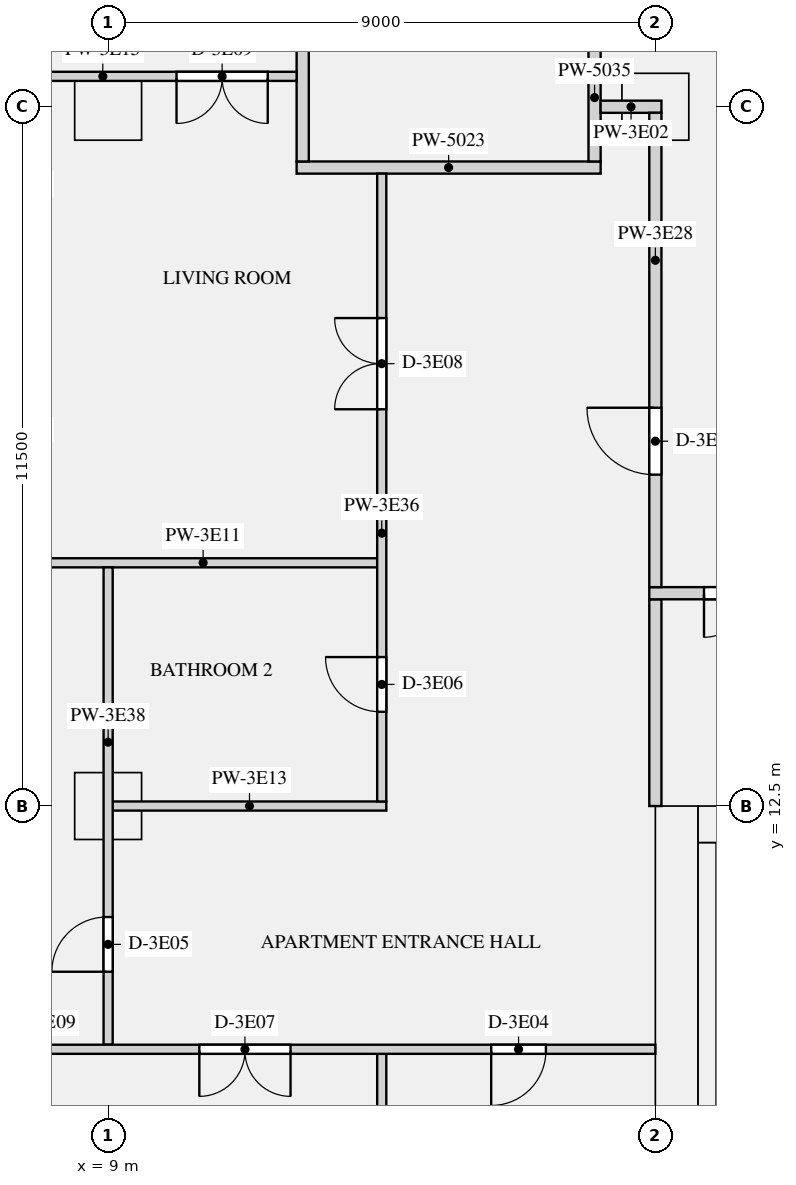
"""IFC4 building model, lengths in metres.
Left out: names, types, materials, properties, quantities, classifications, styles, units other than length and angle.
Written with IfcOpenShell. Run it as: python <this file> out.ifc"""

import sys

from ifc_helpers import new_model, si_unit, direction, frame, frame_2d, origin, origin_2d, place, context, subcontext, project, spatial, rectangle, extrude, element, fill, save


model = new_model("IFC4")
c1 = context("Model", 3, precision=1e-05, world=origin(), true_north=direction((0.0, 1.0)))
c2 = subcontext(c1, "Body", "Model", "MODEL_VIEW")
j1 = project(units=[si_unit("LENGTHUNIT", "METRE"), si_unit("PLANEANGLEUNIT", "RADIAN")], contexts=[c1])
p1 = place(None, origin())
s1 = spatial("IfcSite", under=j1, at=p1, CompositionType="ELEMENT")
p2 = place(p1, origin())
s2 = spatial("IfcBuilding", under=s1, at=p2, CompositionType="ELEMENT")
p3 = place(p2, frame((0.0, 0.0, 172.8)))
s3 = spatial("IfcBuildingStorey", under=s2, at=p3, CompositionType="ELEMENT", Elevation=172.8)
for number, where, z_axis, x_axis in (
    (1, (9.0, 24.0, 0.0), (0.0, 0.0, 1.0), (1.0, 0.0, 0.0)),
    (2, (18.0, 24.0, 0.0), (0.0, 0.0, 1.0), (1.0, 0.0, 0.0)),
    (3, (9.0, 12.5, 0.0), (0.0, 0.0, 1.0), (1.0, 0.0, 0.0)),
):
    element("IfcColumn", number, at=place(p3, frame(where, z_axis=z_axis, x_axis=x_axis)), inside=s3, PredefinedType="COLUMN", context=c2, shape_type="SweptSolid", body=[
        extrude(rectangle(XDim=1.1, YDim=1.1, at=origin_2d()), origin(), (0.0, 0.0, 1.0), 3.15),
    ])
p4 = place(p3, frame((18.35, 0.0, 0.0), z_axis=(0.0, 0.0, 1.0), x_axis=(0.0, 1.0, 0.0)))
e4 = element("IfcWall", 4, at=p4, inside=s3, PredefinedType="SHEAR", context=c2, shape_type="SweptSolid", body=[
    extrude(rectangle(XDim=12.5, YDim=0.7, at=frame_2d((6.25, 0.0))), origin(), (0.0, 0.0, 1.0), 3.15),
])
p5 = place(p3, frame((18.7, 12.2, 0.0), z_axis=(0.0, 0.0, 1.0), x_axis=(1.0, 0.0, 0.0)))
e5 = element("IfcWall", 5, at=p5, inside=s3, PredefinedType="SHEAR", context=c2, shape_type="SweptSolid", body=[
    extrude(rectangle(XDim=34.6, YDim=0.6, at=frame_2d((17.3, 0.0))), origin(), (0.0, 0.0, 1.0), 3.15),
])
p6 = place(p5, frame((24.475, 0.0, 0.0)))
e6 = element("IfcOpeningElement", 6, at=p6, cuts=e5, PredefinedType="OPENING", context=c2, shape_type="SweptSolid", body=[
    extrude(rectangle(XDim=1.1, YDim=2.1, at=frame_2d((0.55, 1.05))), frame((0.0, 0.31, 0.0), z_axis=(0.0, -1.0, 0.0), x_axis=(1.0, 0.0, 0.0)), (0.0, 0.0, 1.0), 0.62),
])
p7 = place(p5, frame((26.725, 0.0, 0.0)))
e7 = element("IfcOpeningElement", 7, at=p7, cuts=e5, PredefinedType="OPENING", context=c2, shape_type="SweptSolid", body=[
    extrude(rectangle(XDim=1.1, YDim=2.1, at=frame_2d((0.55, 1.05))), frame((0.0, 0.31, 0.0), z_axis=(0.0, -1.0, 0.0), x_axis=(1.0, 0.0, 0.0)), (0.0, 0.0, 1.0), 0.62),
])
p8 = place(p5, frame((28.975, 0.0, 0.0)))
e8 = element("IfcOpeningElement", 8, at=p8, cuts=e5, PredefinedType="OPENING", context=c2, shape_type="SweptSolid", body=[
    extrude(rectangle(XDim=1.1, YDim=2.1, at=frame_2d((0.55, 1.05))), frame((0.0, 0.31, 0.0), z_axis=(0.0, -1.0, 0.0), x_axis=(1.0, 0.0, 0.0)), (0.0, 0.0, 1.0), 0.62),
])
p9 = place(p5, frame((11.85, 0.0, 0.0)))
e9 = element("IfcOpeningElement", 9, at=p9, cuts=e5, PredefinedType="OPENING", context=c2, shape_type="SweptSolid", body=[
    extrude(rectangle(XDim=0.9, YDim=2.1, at=frame_2d((0.45, 1.05))), frame((0.0, 0.31, 0.0), z_axis=(0.0, -1.0, 0.0), x_axis=(1.0, 0.0, 0.0)), (0.0, 0.0, 1.0), 0.62),
])
p10 = place(p5, frame((18.35, 0.0, 0.0)))
e10 = element("IfcOpeningElement", 10, at=p10, cuts=e5, PredefinedType="OPENING", context=c2, shape_type="SweptSolid", body=[
    extrude(rectangle(XDim=0.9, YDim=2.1, at=frame_2d((0.45, 1.05))), frame((0.0, 0.31, 0.0), z_axis=(0.0, -1.0, 0.0), x_axis=(1.0, 0.0, 0.0)), (0.0, 0.0, 1.0), 0.62),
])
p11 = place(p5, frame((1.45, 0.0, 0.0)))
e11 = element("IfcOpeningElement", 11, at=p11, cuts=e5, PredefinedType="OPENING", context=c2, shape_type="SweptSolid", body=[
    extrude(rectangle(XDim=1.2, YDim=2.1, at=frame_2d((0.6, 1.05))), frame((0.0, 0.31, 0.0), z_axis=(0.0, -1.0, 0.0), x_axis=(1.0, 0.0, 0.0)), (0.0, 0.0, 1.0), 0.62),
])
p12 = place(p5, frame((31.95, 0.0, 0.0)))
e12 = element("IfcOpeningElement", 12, at=p12, cuts=e5, PredefinedType="OPENING", context=c2, shape_type="SweptSolid", body=[
    extrude(rectangle(XDim=1.2, YDim=2.1, at=frame_2d((0.6, 1.05))), frame((0.0, 0.31, 0.0), z_axis=(0.0, -1.0, 0.0), x_axis=(1.0, 0.0, 0.0)), (0.0, 0.0, 1.0), 0.62),
])
p13 = place(p3, frame((18.85, 1.0, 0.0), z_axis=(0.0, 0.0, 1.0), x_axis=(0.0, 1.0, 0.0)))
e13 = element("IfcWall", 13, at=p13, inside=s3, PredefinedType="SHEAR", context=c2, shape_type="SweptSolid", body=[
    extrude(rectangle(XDim=10.9, YDim=0.3, at=frame_2d((5.45, 0.0))), origin(), (0.0, 0.0, 1.0), 3.15),
])
p14 = place(p3, frame((12.1, 23.0, 0.0), z_axis=(0.0, 0.0, 1.0), x_axis=(1.0, 0.0, 0.0)))
e14 = element("IfcWall", 14, at=p14, inside=s3, PredefinedType="PARTITIONING", context=c2, shape_type="SweptSolid", body=[
    extrude(rectangle(XDim=5.0, YDim=0.2, at=frame_2d((2.5, 0.0))), origin(), (0.0, 0.0, 1.0), 2.83),
])
p15 = place(p3, frame((18.0, 12.5, 0.0), z_axis=(0.0, 0.0, 1.0), x_axis=(0.0, 1.0, 0.0)))
e15 = element("IfcWall", 15, at=p15, inside=s3, PredefinedType="PARTITIONING", context=c2, shape_type="SweptSolid", body=[
    extrude(rectangle(XDim=3.4, YDim=0.2, at=frame_2d((1.7, 0.0))), origin(), (0.0, 0.0, 1.0), 2.83),
])
p16 = place(p3, frame((12.2, 23.1, 0.0), z_axis=(0.0, 0.0, 1.0), x_axis=(0.0, 1.0, 0.0)))
e16 = element("IfcWall", 16, at=p16, inside=s3, PredefinedType="PARTITIONING", context=c2, shape_type="SweptSolid", body=[
    extrude(rectangle(XDim=3.9, YDim=0.2, at=frame_2d((1.95, 0.0))), origin(), (0.0, 0.0, 1.0), 2.83),
])
p17 = place(p3, frame((17.0, 23.1, 0.0), z_axis=(0.0, 0.0, 1.0), x_axis=(0.0, 1.0, 0.0)))
e17 = element("IfcWall", 17, at=p17, inside=s3, PredefinedType="PARTITIONING", context=c2, shape_type="SweptSolid", body=[
    extrude(rectangle(XDim=3.8, YDim=0.2, at=frame_2d((1.9, 0.0))), origin(), (0.0, 0.0, 1.0), 2.83),
])
p18 = place(p17, frame((2.1, 0.0, 0.0)))
e18 = element("IfcOpeningElement", 18, at=p18, cuts=e17, PredefinedType="OPENING", context=c2, shape_type="SweptSolid", body=[
    extrude(rectangle(XDim=1.2, YDim=2.1, at=frame_2d((0.6, 1.05))), frame((0.0, 0.11, 0.0), z_axis=(0.0, -1.0, 0.0), x_axis=(1.0, 0.0, 0.0)), (0.0, 0.0, 1.0), 0.22),
])
p19 = place(p3, frame((17.1, 24.0, 0.0), z_axis=(0.0, 0.0, 1.0), x_axis=(1.0, 0.0, 0.0)))
e19 = element("IfcWall", 19, at=p19, inside=s3, PredefinedType="PARTITIONING", context=c2, shape_type="SweptSolid", body=[
    extrude(rectangle(XDim=1.0, YDim=0.2, at=frame_2d((0.5, 0.0))), origin(), (0.0, 0.0, 1.0), 2.83),
])
p20 = place(p3, frame((5.2, 8.5, 0.0), z_axis=(0.0, 0.0, 1.0), x_axis=(1.0, 0.0, 0.0)))
e20 = element("IfcWall", 20, at=p20, inside=s3, PredefinedType="PARTITIONING", context=c2, shape_type="SweptSolid", body=[
    extrude(rectangle(XDim=12.8, YDim=0.15, at=frame_2d((6.4, 0.0))), origin(), (0.0, 0.0, 1.0), 2.83),
])
p21 = place(p20, frame((10.1, 0.0, 0.0)))
e21 = element("IfcOpeningElement", 21, at=p21, cuts=e20, PredefinedType="OPENING", context=c2, shape_type="SweptSolid", body=[
    extrude(rectangle(XDim=0.9, YDim=2.1, at=frame_2d((0.45, 1.05))), frame((0.0, 0.085, 0.0), z_axis=(0.0, -1.0, 0.0), x_axis=(1.0, 0.0, 0.0)), (0.0, 0.0, 1.0), 0.17),
])
p22 = place(p20, frame((5.3, 0.0, 0.0)))
e22 = element("IfcOpeningElement", 22, at=p22, cuts=e20, PredefinedType="OPENING", context=c2, shape_type="SweptSolid", body=[
    extrude(rectangle(XDim=1.5, YDim=2.1, at=frame_2d((0.75, 1.05))), frame((0.0, 0.085, 0.0), z_axis=(0.0, -1.0, 0.0), x_axis=(1.0, 0.0, 0.0)), (0.0, 0.0, 1.0), 0.17),
])
p23 = place(p3, frame((7.7, 16.5, 0.0), z_axis=(0.0, 0.0, 1.0), x_axis=(1.0, 0.0, 0.0)))
e23 = element("IfcWall", 23, at=p23, inside=s3, PredefinedType="PARTITIONING", context=c2, shape_type="SweptSolid", body=[
    extrude(rectangle(XDim=5.725, YDim=0.15, at=frame_2d((2.863, 0.0))), origin(), (0.0, 0.0, 1.0), 2.83),
])
p24 = place(p3, frame((9.075, 12.5, 0.0), z_axis=(0.0, 0.0, 1.0), x_axis=(1.0, 0.0, 0.0)))
e24 = element("IfcWall", 24, at=p24, inside=s3, PredefinedType="PARTITIONING", context=c2, shape_type="SweptSolid", body=[
    extrude(rectangle(XDim=4.5, YDim=0.15, at=frame_2d((2.25, 0.0))), origin(), (0.0, 0.0, 1.0), 2.83),
])
p25 = place(p3, frame((7.7, 24.5, 0.0), z_axis=(0.0, 0.0, 1.0), x_axis=(1.0, 0.0, 0.0)))
e25 = element("IfcWall", 25, at=p25, inside=s3, PredefinedType="PARTITIONING", context=c2, shape_type="SweptSolid", body=[
    extrude(rectangle(XDim=4.4, YDim=0.15, at=frame_2d((2.2, 0.0))), origin(), (0.0, 0.0, 1.0), 2.83),
])
p26 = place(p25, frame((2.425, 0.0, 0.0)))
e26 = element("IfcOpeningElement", 26, at=p26, cuts=e25, PredefinedType="OPENING", context=c2, shape_type="SweptSolid", body=[
    extrude(rectangle(XDim=1.5, YDim=2.1, at=frame_2d((0.75, 1.05))), frame((0.0, 0.085, 0.0), z_axis=(0.0, -1.0, 0.0), x_axis=(1.0, 0.0, 0.0)), (0.0, 0.0, 1.0), 0.17),
])
p27 = place(p3, frame((17.9, 16.0, 0.0), z_axis=(0.0, 0.0, 1.0), x_axis=(1.0, 0.0, 0.0)))
e27 = element("IfcWall", 27, at=p27, inside=s3, PredefinedType="PARTITIONING", context=c2, shape_type="SweptSolid", body=[
    extrude(rectangle(XDim=36.2, YDim=0.2, at=frame_2d((18.1, 0.0))), origin(), (0.0, 0.0, 1.0), 2.83),
])
p28 = place(p27, frame((0.9, 0.0, 0.0)))
e28 = element("IfcOpeningElement", 28, at=p28, cuts=e27, PredefinedType="OPENING", context=c2, shape_type="SweptSolid", body=[
    extrude(rectangle(XDim=1.4, YDim=2.1, at=frame_2d((0.7, 1.05))), frame((0.0, 0.11, 0.0), z_axis=(0.0, -1.0, 0.0), x_axis=(1.0, 0.0, 0.0)), (0.0, 0.0, 1.0), 0.22),
])
p29 = place(p27, frame((33.9, 0.0, 0.0)))
e29 = element("IfcOpeningElement", 29, at=p29, cuts=e27, PredefinedType="OPENING", context=c2, shape_type="SweptSolid", body=[
    extrude(rectangle(XDim=1.4, YDim=2.1, at=frame_2d((0.7, 1.05))), frame((0.0, 0.11, 0.0), z_axis=(0.0, -1.0, 0.0), x_axis=(1.0, 0.0, 0.0)), (0.0, 0.0, 1.0), 0.22),
])
p30 = place(p3, frame((18.0, 16.1, 0.0), z_axis=(0.0, 0.0, 1.0), x_axis=(0.0, 1.0, 0.0)))
e30 = element("IfcWall", 30, at=p30, inside=s3, PredefinedType="PARTITIONING", context=c2, shape_type="SweptSolid", body=[
    extrude(rectangle(XDim=7.8, YDim=0.2, at=frame_2d((3.9, 0.0))), origin(), (0.0, 0.0, 1.0), 2.83),
])
p31 = place(p30, frame((1.85, 0.0, 0.0)))
e31 = element("IfcOpeningElement", 31, at=p31, cuts=e30, PredefinedType="OPENING", context=c2, shape_type="SweptSolid", body=[
    extrude(rectangle(XDim=1.1, YDim=2.1, at=frame_2d((0.55, 1.05))), frame((0.0, 0.11, 0.0), z_axis=(0.0, -1.0, 0.0), x_axis=(1.0, 0.0, 0.0)), (0.0, 0.0, 1.0), 0.22),
])
p32 = place(p3, frame((13.5, 0.7, 0.0), z_axis=(0.0, 0.0, 1.0), x_axis=(0.0, 1.0, 0.0)))
e32 = element("IfcWall", 32, at=p32, inside=s3, PredefinedType="PARTITIONING", context=c2, shape_type="SweptSolid", body=[
    extrude(rectangle(XDim=7.725, YDim=0.15, at=frame_2d((3.863, 0.0))), origin(), (0.0, 0.0, 1.0), 2.83),
])
p33 = place(p3, frame((13.5, 12.575, 0.0), z_axis=(0.0, 0.0, 1.0), x_axis=(0.0, 1.0, 0.0)))
e33 = element("IfcWall", 33, at=p33, inside=s3, PredefinedType="PARTITIONING", context=c2, shape_type="SweptSolid", body=[
    extrude(rectangle(XDim=10.325, YDim=0.15, at=frame_2d((5.163, 0.0))), origin(), (0.0, 0.0, 1.0), 2.83),
])
p34 = place(p33, frame((1.475, 0.0, 0.0)))
e34 = element("IfcOpeningElement", 34, at=p34, cuts=e33, PredefinedType="OPENING", context=c2, shape_type="SweptSolid", body=[
    extrude(rectangle(XDim=0.9, YDim=2.1, at=frame_2d((0.45, 1.05))), frame((0.0, 0.085, 0.0), z_axis=(0.0, -1.0, 0.0), x_axis=(1.0, 0.0, 0.0)), (0.0, 0.0, 1.0), 0.17),
])
p35 = place(p33, frame((6.45, 0.0, 0.0)))
e35 = element("IfcOpeningElement", 35, at=p35, cuts=e33, PredefinedType="OPENING", context=c2, shape_type="SweptSolid", body=[
    extrude(rectangle(XDim=1.5, YDim=2.1, at=frame_2d((0.75, 1.05))), frame((0.0, 0.085, 0.0), z_axis=(0.0, -1.0, 0.0), x_axis=(1.0, 0.0, 0.0)), (0.0, 0.0, 1.0), 0.17),
])
p36 = place(p3, frame((9.0, 8.575, 0.0), z_axis=(0.0, 0.0, 1.0), x_axis=(0.0, 1.0, 0.0)))
e36 = element("IfcWall", 36, at=p36, inside=s3, PredefinedType="PARTITIONING", context=c2, shape_type="SweptSolid", body=[
    extrude(rectangle(XDim=7.85, YDim=0.15, at=frame_2d((3.925, 0.0))), origin(), (0.0, 0.0, 1.0), 2.83),
])
p37 = place(p36, frame((1.2, 0.0, 0.0)))
e37 = element("IfcOpeningElement", 37, at=p37, cuts=e36, PredefinedType="OPENING", context=c2, shape_type="SweptSolid", body=[
    extrude(rectangle(XDim=0.9, YDim=2.1, at=frame_2d((0.45, 1.05))), frame((0.0, 0.085, 0.0), z_axis=(0.0, -1.0, 0.0), x_axis=(1.0, 0.0, 0.0)), (0.0, 0.0, 1.0), 0.17),
])
p38 = place(p28, frame((1.4, 0.0, 0.0), z_axis=(0.0, 0.0, 1.0), x_axis=(-1.0, 0.0, 0.0)))
e38 = element("IfcDoor", 38, at=p38, inside=s3, OperationType="DOUBLE_DOOR_SINGLE_SWING", PredefinedType="DOOR", context=c2, shape_type="SweptSolid", body=[
    extrude(rectangle(XDim=1.4, YDim=2.1, at=frame_2d((0.7, 1.05))), frame((0.0, 0.025, 0.0), z_axis=(0.0, -1.0, 0.0), x_axis=(1.0, 0.0, 0.0)), (0.0, 0.0, 1.0), 0.05),
])
fill(e28, e38)
p39 = place(p31, origin())
e39 = element("IfcDoor", 39, at=p39, inside=s3, OperationType="SINGLE_SWING_RIGHT", PredefinedType="DOOR", context=c2, shape_type="SweptSolid", body=[
    extrude(rectangle(XDim=1.1, YDim=2.1, at=frame_2d((0.55, 1.05))), frame((0.0, 0.025, 0.0), z_axis=(0.0, -1.0, 0.0), x_axis=(1.0, 0.0, 0.0)), (0.0, 0.0, 1.0), 0.05),
])
fill(e31, e39)
p40 = place(p21, frame((0.9, 0.0, 0.0), z_axis=(0.0, 0.0, 1.0), x_axis=(-1.0, 0.0, 0.0)))
e40 = element("IfcDoor", 40, at=p40, inside=s3, OperationType="SINGLE_SWING_RIGHT", PredefinedType="DOOR", context=c2, shape_type="SweptSolid", body=[
    extrude(rectangle(XDim=0.9, YDim=2.1, at=frame_2d((0.45, 1.05))), frame((0.0, 0.025, 0.0), z_axis=(0.0, -1.0, 0.0), x_axis=(1.0, 0.0, 0.0)), (0.0, 0.0, 1.0), 0.05),
])
fill(e21, e40)
p41 = place(p37, origin())
e41 = element("IfcDoor", 41, at=p41, inside=s3, OperationType="SINGLE_SWING_LEFT", PredefinedType="DOOR", context=c2, shape_type="SweptSolid", body=[
    extrude(rectangle(XDim=0.9, YDim=2.1, at=frame_2d((0.45, 1.05))), frame((0.0, 0.025, 0.0), z_axis=(0.0, -1.0, 0.0), x_axis=(1.0, 0.0, 0.0)), (0.0, 0.0, 1.0), 0.05),
])
fill(e37, e41)
p42 = place(p34, origin())
e42 = element("IfcDoor", 42, at=p42, inside=s3, OperationType="SINGLE_SWING_RIGHT", PredefinedType="DOOR", context=c2, shape_type="SweptSolid", body=[
    extrude(rectangle(XDim=0.9, YDim=2.1, at=frame_2d((0.45, 1.05))), frame((0.0, 0.025, 0.0), z_axis=(0.0, -1.0, 0.0), x_axis=(1.0, 0.0, 0.0)), (0.0, 0.0, 1.0), 0.05),
])
fill(e34, e42)
p43 = place(p22, frame((1.5, 0.0, 0.0), z_axis=(0.0, 0.0, 1.0), x_axis=(-1.0, 0.0, 0.0)))
e43 = element("IfcDoor", 43, at=p43, inside=s3, OperationType="DOUBLE_DOOR_SINGLE_SWING", PredefinedType="DOOR", context=c2, shape_type="SweptSolid", body=[
    extrude(rectangle(XDim=1.5, YDim=2.1, at=frame_2d((0.75, 1.05))), frame((0.0, 0.025, 0.0), z_axis=(0.0, -1.0, 0.0), x_axis=(1.0, 0.0, 0.0)), (0.0, 0.0, 1.0), 0.05),
])
fill(e22, e43)
p44 = place(p35, origin())
e44 = element("IfcDoor", 44, at=p44, inside=s3, OperationType="DOUBLE_DOOR_SINGLE_SWING", PredefinedType="DOOR", context=c2, shape_type="SweptSolid", body=[
    extrude(rectangle(XDim=1.5, YDim=2.1, at=frame_2d((0.75, 1.05))), frame((0.0, 0.025, 0.0), z_axis=(0.0, -1.0, 0.0), x_axis=(1.0, 0.0, 0.0)), (0.0, 0.0, 1.0), 0.05),
])
fill(e35, e44)
p45 = place(p26, frame((1.5, 0.0, 0.0), z_axis=(0.0, 0.0, 1.0), x_axis=(-1.0, 0.0, 0.0)))
e45 = element("IfcDoor", 45, at=p45, inside=s3, OperationType="DOUBLE_DOOR_SINGLE_SWING", PredefinedType="DOOR", context=c2, shape_type="SweptSolid", body=[
    extrude(rectangle(XDim=1.5, YDim=2.1, at=frame_2d((0.75, 1.05))), frame((0.0, 0.025, 0.0), z_axis=(0.0, -1.0, 0.0), x_axis=(1.0, 0.0, 0.0)), (0.0, 0.0, 1.0), 0.05),
])
fill(e26, e45)
save(model, sys.argv[1])
